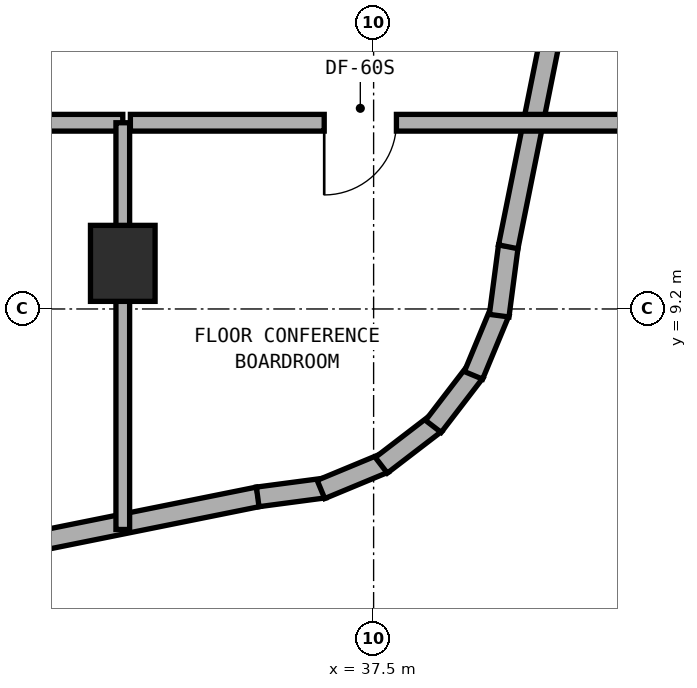
"""IFC4 building model, lengths in metres.
Left out: names, types, materials, properties, quantities, classifications, styles, units other than length and angle.
Written with IfcOpenShell. Run it as: python <this file> out.ifc"""

import sys

from ifc_helpers import new_model, si_unit, direction, frame, frame_2d, origin, origin_2d, place, context, subcontext, project, spatial, rectangle, extrude, element, fill, save


model = new_model("IFC4")
c1 = context("Model", 3, precision=1e-05, world=origin(), true_north=direction((0.0, 1.0)))
c2 = subcontext(c1, "Body", "Model", "MODEL_VIEW")
j1 = project(units=[si_unit("LENGTHUNIT", "METRE"), si_unit("PLANEANGLEUNIT", "RADIAN")], contexts=[c1])
p1 = place(None, origin())
s1 = spatial("IfcSite", under=j1, at=p1, CompositionType="ELEMENT")
p2 = place(p1, origin())
s2 = spatial("IfcBuilding", under=s1, at=p2, CompositionType="ELEMENT")
p3 = place(p2, frame((0.0, 0.0, 169.5)))
s3 = spatial("IfcBuildingStorey", under=s2, at=p3, CompositionType="ELEMENT", Elevation=169.5)
p4 = place(p3, frame((34.2, 9.8, 0.0), z_axis=(0.0, 0.0, 1.0), x_axis=(1.0, 0.0, 0.0)))
e1 = element("IfcColumn", 1, at=p4, inside=s3, PredefinedType="COLUMN", context=c2, shape_type="SweptSolid", body=[
    extrude(rectangle(XDim=0.85, YDim=1.0, at=origin_2d()), origin(), (0.0, 0.0, 1.0), 3.5),
])
p5 = place(p3, frame((26.98, 4.916, 0.0), z_axis=(0.0, 0.0, 1.0), x_axis=(0.980315963543, 0.197435082048, 0.0)))
e2 = element("IfcWall", 2, at=p5, inside=s3, PredefinedType="STANDARD", context=c2, shape_type="SweptSolid", body=[
    extrude(rectangle(XDim=9.183, YDim=0.26, at=frame_2d((4.591, 0.0))), origin(), (0.0, 0.0, 1.0), 3.18),
])
p6 = place(p5, frame((2.595, 0.0, 0.85)))
e3 = element("IfcOpeningElement", 3, at=p6, cuts=e2, PredefinedType="OPENING", context=c2, shape_type="SweptSolid", body=[
    extrude(rectangle(XDim=2.1, YDim=1.5, at=frame_2d((1.05, 0.75))), frame((0.0, 0.14, 0.0), z_axis=(0.0, -1.0, 0.0), x_axis=(1.0, 0.0, 0.0)), (0.0, 0.0, 1.0), 0.28),
])
p7 = place(p3, frame((35.975, 6.728, 0.0), z_axis=(0.0, 0.0, 1.0), x_axis=(0.991388484223, 0.130953706898, 0.0)))
e4 = element("IfcWall", 4, at=p7, inside=s3, PredefinedType="STANDARD", context=c2, shape_type="SweptSolid", body=[
    extrude(rectangle(XDim=0.885, YDim=0.26, at=frame_2d((0.443, 0.0))), origin(), (0.0, 0.0, 1.0), 3.18),
])
p8 = place(p3, frame((36.807, 6.826, 0.0), z_axis=(0.0, 0.0, 1.0), x_axis=(0.923627776508, 0.383290660547, 0.0)))
e5 = element("IfcWall", 5, at=p8, inside=s3, PredefinedType="STANDARD", context=c2, shape_type="SweptSolid", body=[
    extrude(rectangle(XDim=0.903, YDim=0.26, at=frame_2d((0.452, 0.0))), origin(), (0.0, 0.0, 1.0), 3.18),
])
p9 = place(p3, frame((37.601, 7.144, 0.0), z_axis=(0.0, 0.0, 1.0), x_axis=(0.793458244748, 0.608624690463, 0.0)))
e6 = element("IfcWall", 6, at=p9, inside=s3, PredefinedType="STANDARD", context=c2, shape_type="SweptSolid", body=[
    extrude(rectangle(XDim=0.902, YDim=0.26, at=frame_2d((0.451, 0.0))), origin(), (0.0, 0.0, 1.0), 3.18),
])
p10 = place(p3, frame((38.286, 7.655, 0.0), z_axis=(0.0, 0.0, 1.0), x_axis=(0.608494022858, 0.793558456666, 0.0)))
e7 = element("IfcWall", 7, at=p10, inside=s3, PredefinedType="STANDARD", context=c2, shape_type="SweptSolid", body=[
    extrude(rectangle(XDim=0.902, YDim=0.26, at=frame_2d((0.451, 0.0))), origin(), (0.0, 0.0, 1.0), 3.18),
])
p11 = place(p3, frame((38.814, 8.327, 0.0), z_axis=(0.0, 0.0, 1.0), x_axis=(0.383155708213, 0.923683767999, 0.0)))
e8 = element("IfcWall", 8, at=p11, inside=s3, PredefinedType="STANDARD", context=c2, shape_type="SweptSolid", body=[
    extrude(rectangle(XDim=0.903, YDim=0.26, at=frame_2d((0.451, 0.0))), origin(), (0.0, 0.0, 1.0), 3.18),
])
p12 = place(p3, frame((39.152, 9.112, 0.0), z_axis=(0.0, 0.0, 1.0), x_axis=(0.130200706103, 0.991487658083, 0.0)))
e9 = element("IfcWall", 9, at=p12, inside=s3, PredefinedType="STANDARD", context=c2, shape_type="SweptSolid", body=[
    extrude(rectangle(XDim=0.921, YDim=0.26, at=frame_2d((0.46, 0.0))), origin(), (0.0, 0.0, 1.0), 3.18),
])
p13 = place(p3, frame((39.271, 10.018, 0.0), z_axis=(0.0, 0.0, 1.0), x_axis=(0.197435082048, 0.980315963543, 0.0)))
e10 = element("IfcWall", 10, at=p13, inside=s3, PredefinedType="STANDARD", context=c2, shape_type="SweptSolid", body=[
    extrude(rectangle(XDim=9.183, YDim=0.26, at=frame_2d((4.591, 0.0))), origin(), (0.0, 0.0, 1.0), 3.18),
])
p14 = place(p13, frame((5.349, 0.0, 0.85)))
e11 = element("IfcOpeningElement", 11, at=p14, cuts=e10, PredefinedType="OPENING", context=c2, shape_type="SweptSolid", body=[
    extrude(rectangle(XDim=2.1, YDim=1.5, at=frame_2d((1.05, 0.75))), frame((0.0, 0.14, 0.0), z_axis=(0.0, -1.0, 0.0), x_axis=(1.0, 0.0, 0.0)), (0.0, 0.0, 1.0), 0.28),
])
p15 = place(p3, frame((28.0, 11.65, 0.0), z_axis=(0.0, 0.0, 1.0), x_axis=(1.0, 0.0, 0.0)))
e12 = element("IfcWall", 12, at=p15, inside=s3, PredefinedType="SOLIDWALL", context=c2, shape_type="SweptSolid", body=[
    extrude(rectangle(XDim=6.2, YDim=0.22, at=frame_2d((3.1, 0.0))), origin(), (0.0, 0.0, 1.0), 2.855),
])
p16 = place(p15, frame((2.625, 0.0, 0.0)))
e13 = element("IfcOpeningElement", 13, at=p16, cuts=e12, PredefinedType="OPENING", context=c2, shape_type="SweptSolid", body=[
    extrude(rectangle(XDim=0.95, YDim=2.1, at=frame_2d((0.475, 1.05))), frame((0.0, 0.12, 0.0), z_axis=(0.0, -1.0, 0.0), x_axis=(1.0, 0.0, 0.0)), (0.0, 0.0, 1.0), 0.24),
])
p17 = place(p3, frame((34.2, 6.299, 0.0), z_axis=(0.0, 0.0, 1.0), x_axis=(0.0, 1.0, 0.0)))
e14 = element("IfcWall", 14, at=p17, inside=s3, PredefinedType="SOLIDWALL", context=c2, shape_type="SweptSolid", body=[
    extrude(rectangle(XDim=5.351, YDim=0.18, at=frame_2d((2.675, 0.0))), origin(), (0.0, 0.0, 1.0), 2.795),
])
p18 = place(p3, frame((34.3, 11.65, 0.0), z_axis=(0.0, 0.0, 1.0), x_axis=(1.0, 0.0, 0.0)))
e15 = element("IfcWall", 15, at=p18, inside=s3, PredefinedType="SOLIDWALL", context=c2, shape_type="SweptSolid", body=[
    extrude(rectangle(XDim=6.64, YDim=0.22, at=frame_2d((3.32, 0.0))), origin(), (0.0, 0.0, 1.0), 2.795),
])
p19 = place(p18, frame((2.55, 0.0, 0.0)))
e16 = element("IfcOpeningElement", 16, at=p19, cuts=e15, PredefinedType="OPENING", context=c2, shape_type="SweptSolid", body=[
    extrude(rectangle(XDim=0.95, YDim=2.1, at=frame_2d((0.475, 1.05))), frame((0.0, 0.12, 0.0), z_axis=(0.0, -1.0, 0.0), x_axis=(1.0, 0.0, 0.0)), (0.0, 0.0, 1.0), 0.24),
])
p20 = place(p19, frame((0.95, 0.0, 0.0), z_axis=(0.0, 0.0, 1.0), x_axis=(-1.0, 0.0, 0.0)))
e17 = element("IfcDoor", 17, at=p20, inside=s3, OperationType="SINGLE_SWING_RIGHT", PredefinedType="DOOR", context=c2, shape_type="SweptSolid", body=[
    extrude(rectangle(XDim=0.95, YDim=2.1, at=frame_2d((0.475, 1.05))), frame((0.0, 0.025, 0.0), z_axis=(0.0, -1.0, 0.0), x_axis=(1.0, 0.0, 0.0)), (0.0, 0.0, 1.0), 0.05),
])
fill(e16, e17)
save(model, sys.argv[1])
